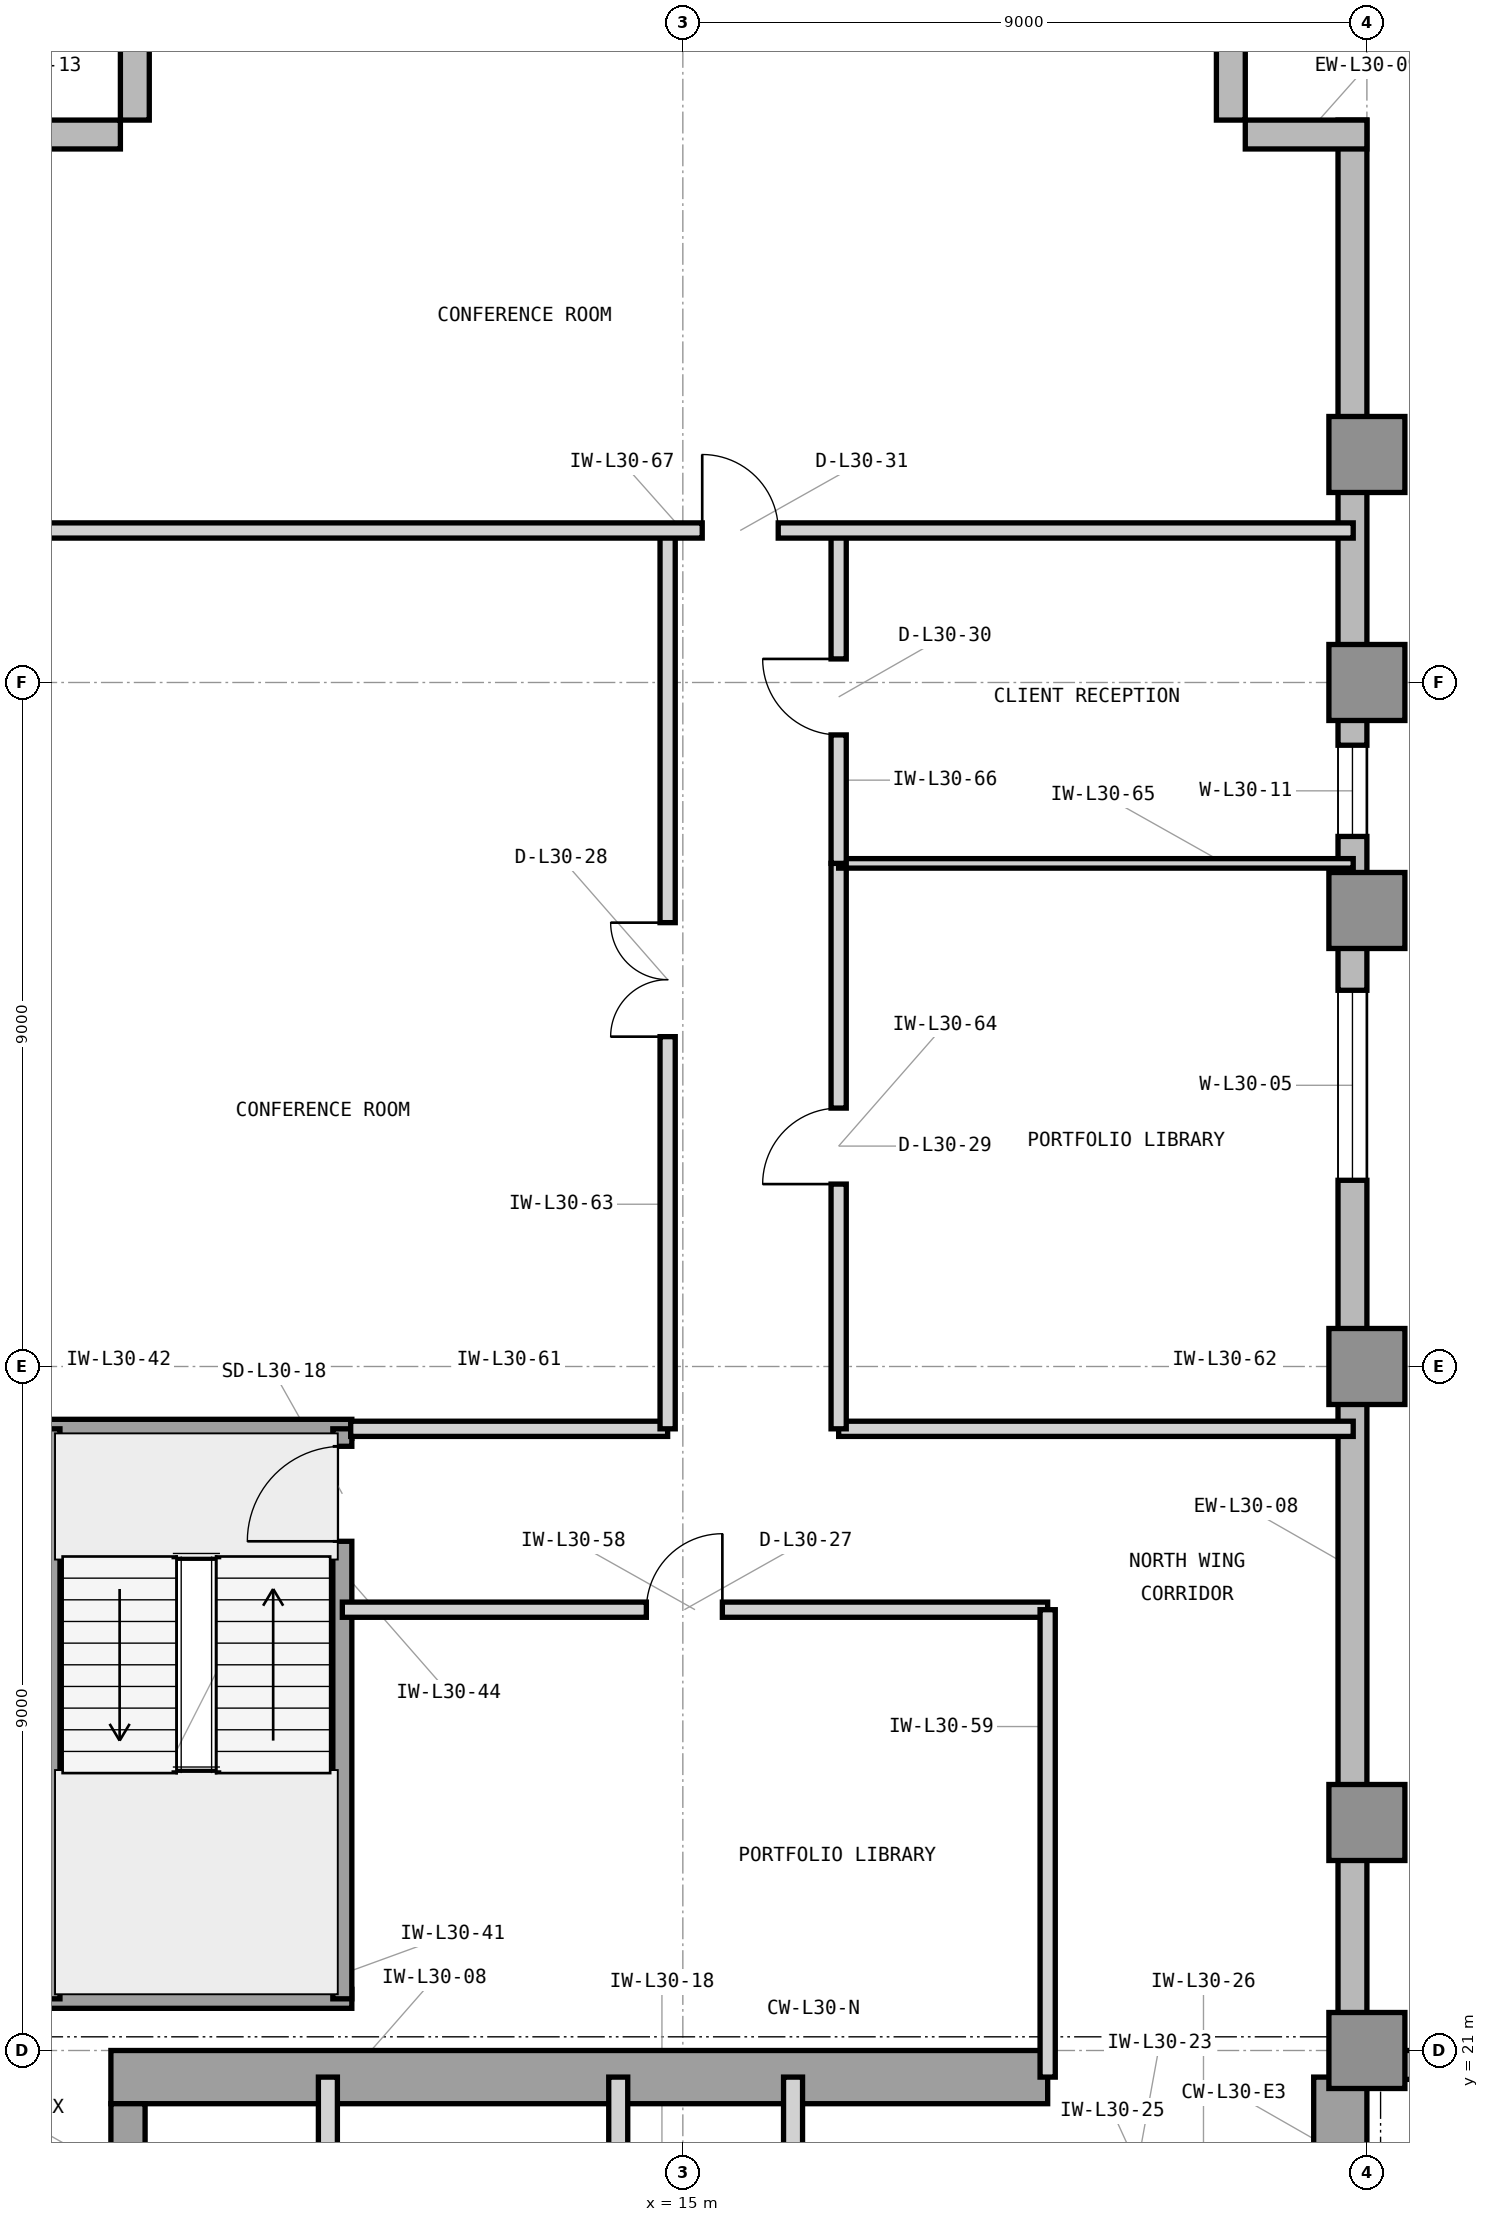
"""IFC4 building model, lengths in metres.
Left out: names, types, materials, properties, quantities, classifications, styles, units other than length and angle.
Written with IfcOpenShell. Run it as: python <this file> out.ifc"""

import sys

from ifc_helpers import new_model, si_unit, direction, frame, frame_2d, origin, origin_2d, place, context, subcontext, project, spatial, rectangle, extrude, element, fill, save


model = new_model("IFC4")
c1 = context("Model", 3, precision=1e-05, world=origin(), true_north=direction((0.0, 1.0)))
c2 = subcontext(c1, "Body", "Model", "MODEL_VIEW")
j1 = project(units=[si_unit("LENGTHUNIT", "METRE"), si_unit("PLANEANGLEUNIT", "RADIAN")], contexts=[c1])
p1 = place(None, origin())
s1 = spatial("IfcSite", under=j1, at=p1, CompositionType="ELEMENT")
p2 = place(p1, origin())
s2 = spatial("IfcBuilding", under=s1, at=p2, CompositionType="ELEMENT")
p3 = place(p2, frame((0.0, 0.0, 128.4)))
s3 = spatial("IfcBuildingStorey", under=s2, at=p3, CompositionType="ELEMENT", Elevation=128.4)
p4 = place(p3, frame((7.475, 20.65, 0.0), z_axis=(0.0, 0.0, 1.0), x_axis=(1.0, 0.0, 0.0)))
e1 = element("IfcWall", 1, at=p4, inside=s3, PredefinedType="SHEAR", context=c2, shape_type="SweptSolid", body=[
    extrude(rectangle(XDim=12.325, YDim=0.7, at=frame_2d((6.163, 0.0))), origin(), (0.0, 0.0, 1.0), 3.9),
])
p5 = place(p3, frame((23.65, 16.6, 0.0), z_axis=(0.0, 0.0, 1.0), x_axis=(0.0, 1.0, 0.0)))
e2 = element("IfcWall", 2, at=p5, inside=s3, PredefinedType="SHEAR", context=c2, shape_type="SweptSolid", body=[
    extrude(rectangle(XDim=4.05, YDim=0.7, at=frame_2d((2.025, 0.0))), origin(), (0.0, 0.0, 1.0), 3.9),
])
p6 = place(p3, frame((7.7, 19.575, 0.0), z_axis=(0.0, 0.0, 1.0), x_axis=(0.0, 1.0, 0.0)))
e3 = element("IfcWall", 3, at=p6, inside=s3, PredefinedType="SHEAR", context=c2, shape_type="SweptSolid", body=[
    extrude(rectangle(XDim=0.725, YDim=0.45, at=frame_2d((0.363, 0.0))), origin(), (0.0, 0.0, 1.0), 3.9),
])
for number, where, z_axis, x_axis in (
    (4, (24.0, 21.0, 0.0), (0.0, 0.0, 1.0), (1.0, 0.0, 0.0)),
    (5, (24.0, 24.0, 0.0), (0.0, 0.0, 1.0), (1.0, 0.0, 0.0)),
    (6, (24.0, 30.0, 0.0), (0.0, 0.0, 1.0), (1.0, 0.0, 0.0)),
    (7, (24.0, 36.0, 0.0), (0.0, 0.0, 1.0), (1.0, 0.0, 0.0)),
    (8, (24.0, 39.0, 0.0), (0.0, 0.0, 1.0), (1.0, 0.0, 0.0)),
    (9, (24.0, 42.0, 0.0), (0.0, 0.0, 1.0), (1.0, 0.0, 0.0)),
):
    element("IfcColumn", number, at=place(p3, frame(where, z_axis=z_axis, x_axis=x_axis)), inside=s3, PredefinedType="COLUMN", context=c2, shape_type="SweptSolid", body=[
        extrude(rectangle(XDim=1.0, YDim=1.0, at=origin_2d()), origin(), (0.0, 0.0, 1.0), 3.9),
    ])
p7 = place(p3, frame((41.55, 20.81, 0.0), z_axis=(0.0, 0.0, 1.0), x_axis=(-1.0, 0.0, 0.0)))
e10 = element("IfcWall", 10, at=p7, inside=s3, PredefinedType="STANDARD", context=c2, shape_type="SweptSolid", body=[
    extrude(rectangle(XDim=17.55, YDim=0.38, at=frame_2d((8.775, 0.0))), origin(), (0.0, 0.0, 1.0), 3.7),
])
p8 = place(p7, frame((2.025, 0.0, 0.85)))
e11 = element("IfcOpeningElement", 11, at=p8, cuts=e10, PredefinedType="OPENING", context=c2, shape_type="SweptSolid", body=[
    extrude(rectangle(XDim=1.8, YDim=2.25, at=frame_2d((0.9, 1.125))), frame((0.0, 0.2, 0.0), z_axis=(0.0, -1.0, 0.0), x_axis=(1.0, 0.0, 0.0)), (0.0, 0.0, 1.0), 0.4),
])
p9 = place(p7, frame((15.384, 0.0, 0.85)))
e12 = element("IfcOpeningElement", 12, at=p9, cuts=e10, PredefinedType="OPENING", context=c2, shape_type="SweptSolid", body=[
    extrude(rectangle(XDim=1.2, YDim=2.25, at=frame_2d((0.6, 1.125))), frame((0.0, 0.2, 0.0), z_axis=(0.0, -1.0, 0.0), x_axis=(1.0, 0.0, 0.0)), (0.0, 0.0, 1.0), 0.4),
])
p10 = place(p7, frame((9.854, 0.0, 0.85)))
e13 = element("IfcOpeningElement", 13, at=p10, cuts=e10, PredefinedType="OPENING", context=c2, shape_type="SweptSolid", body=[
    extrude(rectangle(XDim=2.5, YDim=2.25, at=frame_2d((1.25, 1.125))), frame((0.0, 0.2, 0.0), z_axis=(0.0, -1.0, 0.0), x_axis=(1.0, 0.0, 0.0)), (0.0, 0.0, 1.0), 0.4),
])
p11 = place(p3, frame((23.81, 21.0, 0.0), z_axis=(0.0, 0.0, 1.0), x_axis=(0.0, 1.0, 0.0)))
e14 = element("IfcWall", 14, at=p11, inside=s3, PredefinedType="STANDARD", context=c2, shape_type="SweptSolid", body=[
    extrude(rectangle(XDim=25.4, YDim=0.38, at=frame_2d((12.7, 0.0))), origin(), (0.0, 0.0, 1.0), 3.7),
])
p12 = place(p11, frame((11.45, 0.0, 0.85)))
e15 = element("IfcOpeningElement", 15, at=p12, cuts=e14, PredefinedType="OPENING", context=c2, shape_type="SweptSolid", body=[
    extrude(rectangle(XDim=2.5, YDim=2.25, at=frame_2d((1.25, 1.125))), frame((0.0, 0.2, 0.0), z_axis=(0.0, -1.0, 0.0), x_axis=(1.0, 0.0, 0.0)), (0.0, 0.0, 1.0), 0.4),
])
p13 = place(p11, frame((15.974, 0.0, 0.85)))
e16 = element("IfcOpeningElement", 16, at=p13, cuts=e14, PredefinedType="OPENING", context=c2, shape_type="SweptSolid", body=[
    extrude(rectangle(XDim=1.2, YDim=2.25, at=frame_2d((0.6, 1.125))), frame((0.0, 0.2, 0.0), z_axis=(0.0, -1.0, 0.0), x_axis=(1.0, 0.0, 0.0)), (0.0, 0.0, 1.0), 0.4),
])
for number, where, z_axis, x_axis in (
    (17, (24.0, 46.21, 0.0), (0.0, 0.0, 1.0), (-1.0, 0.0, 0.0)),
    (18, (22.21, 46.4, 0.0), (0.0, 0.0, 1.0), (0.0, 1.0, 0.0)),
    (19, (7.79, 48.0, 0.0), (0.0, 0.0, 1.0), (0.0, -1.0, 0.0)),
    (20, (7.6, 46.21, 0.0), (0.0, 0.0, 1.0), (-1.0, 0.0, 0.0)),
):
    element("IfcWall", number, at=place(p3, frame(where, z_axis=z_axis, x_axis=x_axis)), inside=s3, PredefinedType="STANDARD", context=c2, shape_type="SweptSolid", body=[
        extrude(rectangle(XDim=1.6, YDim=0.38, at=frame_2d((0.8, 0.0))), origin(), (0.0, 0.0, 1.0), 3.7),
    ])
p14 = place(p3, frame((10.33, 19.45, 0.0), z_axis=(0.0, 0.0, 1.0), x_axis=(0.0, 1.0, 0.0)))
e21 = element("IfcWall", 21, at=p14, inside=s3, PredefinedType="PARTITIONING", context=c2, shape_type="SweptSolid", body=[
    extrude(rectangle(XDim=1.2, YDim=0.25, at=frame_2d((0.6, 0.0))), origin(), (0.0, 0.0, 1.0), 2.994),
])
for number, where, z_axis, x_axis in (
    (22, (14.15, 16.7, 0.0), (0.0, 0.0, 1.0), (0.0, 1.0, 0.0)),
    (23, (16.45, 16.7, 0.0), (0.0, 0.0, 1.0), (0.0, 1.0, 0.0)),
):
    element("IfcWall", number, at=place(p3, frame(where, z_axis=z_axis, x_axis=x_axis)), inside=s3, PredefinedType="PARTITIONING", context=c2, shape_type="SweptSolid", body=[
        extrude(rectangle(XDim=3.95, YDim=0.25, at=frame_2d((1.975, 0.0))), origin(), (0.0, 0.0, 1.0), 3.69),
    ])
for number, where, z_axis, x_axis in (
    (24, (6.555, 21.68, 0.0), (0.0, 0.0, 1.0), (1.0, 0.0, 0.0)),
    (25, (6.555, 29.18, 0.0), (0.0, 0.0, 1.0), (1.0, 0.0, 0.0)),
):
    element("IfcWall", number, at=place(p3, frame(where, z_axis=z_axis, x_axis=x_axis)), inside=s3, PredefinedType="SHEAR", context=c2, shape_type="SweptSolid", body=[
        extrude(rectangle(XDim=4.09, YDim=0.25, at=frame_2d((2.045, 0.0))), origin(), (0.0, 0.0, 1.0), 3.9),
    ])
p15 = place(p3, frame((6.68, 21.68, 0.0), z_axis=(0.0, 0.0, 1.0), x_axis=(0.0, 1.0, 0.0)))
e26 = element("IfcWall", 26, at=p15, inside=s3, PredefinedType="SHEAR", context=c2, shape_type="SweptSolid", body=[
    extrude(rectangle(XDim=7.5, YDim=0.25, at=frame_2d((3.75, 0.0))), origin(), (0.0, 0.0, 1.0), 3.9),
])
p16 = place(p3, frame((10.52, 21.68, 0.0), z_axis=(0.0, 0.0, 1.0), x_axis=(0.0, 1.0, 0.0)))
e27 = element("IfcWall", 27, at=p16, inside=s3, PredefinedType="SHEAR", context=c2, shape_type="SweptSolid", body=[
    extrude(rectangle(XDim=7.5, YDim=0.25, at=frame_2d((3.75, 0.0))), origin(), (0.0, 0.0, 1.0), 3.9),
])
p17 = place(p16, frame((6.02, 0.0, 0.0)))
e28 = element("IfcOpeningElement", 28, at=p17, cuts=e27, PredefinedType="OPENING", context=c2, shape_type="SweptSolid", body=[
    extrude(rectangle(XDim=1.25, YDim=2.2, at=frame_2d((0.625, 1.1))), frame((0.0, 0.135, 0.0), z_axis=(0.0, -1.0, 0.0), x_axis=(1.0, 0.0, 0.0)), (0.0, 0.0, 1.0), 0.27),
])
p18 = place(p3, frame((10.52, 26.8, 0.0), z_axis=(0.0, 0.0, 1.0), x_axis=(1.0, 0.0, 0.0)))
e29 = element("IfcWall", 29, at=p18, inside=s3, PredefinedType="PARTITIONING", context=c2, shape_type="SweptSolid", body=[
    extrude(rectangle(XDim=9.28, YDim=0.2, at=frame_2d((4.64, 0.0))), origin(), (0.0, 0.0, 1.0), 3.69),
])
p19 = place(p18, frame((4.0, 0.0, 0.0)))
e30 = element("IfcOpeningElement", 30, at=p19, cuts=e29, PredefinedType="OPENING", context=c2, shape_type="SweptSolid", body=[
    extrude(rectangle(XDim=1.0, YDim=2.15, at=frame_2d((0.5, 1.075))), frame((0.0, 0.11, 0.0), z_axis=(0.0, -1.0, 0.0), x_axis=(1.0, 0.0, 0.0)), (0.0, 0.0, 1.0), 0.22),
])
p20 = place(p3, frame((19.8, 20.65, 0.0), z_axis=(0.0, 0.0, 1.0), x_axis=(0.0, 1.0, 0.0)))
e31 = element("IfcWall", 31, at=p20, inside=s3, PredefinedType="PARTITIONING", context=c2, shape_type="SweptSolid", body=[
    extrude(rectangle(XDim=6.15, YDim=0.2, at=frame_2d((3.075, 0.0))), origin(), (0.0, 0.0, 1.0), 3.69),
])
p21 = place(p3, frame((10.63, 29.18, 0.0), z_axis=(0.0, 0.0, 1.0), x_axis=(1.0, 0.0, 0.0)))
e32 = element("IfcWall", 32, at=p21, inside=s3, PredefinedType="PARTITIONING", context=c2, shape_type="SweptSolid", body=[
    extrude(rectangle(XDim=4.17, YDim=0.2, at=frame_2d((2.085, 0.0))), origin(), (0.0, 0.0, 1.0), 3.69),
])
p22 = place(p3, frame((17.05, 29.18, 0.0), z_axis=(0.0, 0.0, 1.0), x_axis=(1.0, 0.0, 0.0)))
e33 = element("IfcWall", 33, at=p22, inside=s3, PredefinedType="PARTITIONING", context=c2, shape_type="SweptSolid", body=[
    extrude(rectangle(XDim=6.77, YDim=0.2, at=frame_2d((3.385, 0.0))), origin(), (0.0, 0.0, 1.0), 3.69),
])
p23 = place(p3, frame((14.8, 29.18, 0.0), z_axis=(0.0, 0.0, 1.0), x_axis=(0.0, 1.0, 0.0)))
e34 = element("IfcWall", 34, at=p23, inside=s3, PredefinedType="PARTITIONING", context=c2, shape_type="SweptSolid", body=[
    extrude(rectangle(XDim=11.82, YDim=0.2, at=frame_2d((5.91, 0.0))), origin(), (0.0, 0.0, 1.0), 3.69),
])
p24 = place(p23, frame((5.16, 0.0, 0.0)))
e35 = element("IfcOpeningElement", 35, at=p24, cuts=e34, PredefinedType="OPENING", context=c2, shape_type="SweptSolid", body=[
    extrude(rectangle(XDim=1.5, YDim=2.3, at=frame_2d((0.75, 1.15))), frame((0.0, 0.11, 0.0), z_axis=(0.0, -1.0, 0.0), x_axis=(1.0, 0.0, 0.0)), (0.0, 0.0, 1.0), 0.22),
])
p25 = place(p3, frame((17.05, 29.18, 0.0), z_axis=(0.0, 0.0, 1.0), x_axis=(0.0, 1.0, 0.0)))
e36 = element("IfcWall", 36, at=p25, inside=s3, PredefinedType="PARTITIONING", context=c2, shape_type="SweptSolid", body=[
    extrude(rectangle(XDim=7.44, YDim=0.2, at=frame_2d((3.72, 0.0))), origin(), (0.0, 0.0, 1.0), 3.69),
])
p26 = place(p25, frame((3.22, 0.0, 0.0)))
e37 = element("IfcOpeningElement", 37, at=p26, cuts=e36, PredefinedType="OPENING", context=c2, shape_type="SweptSolid", body=[
    extrude(rectangle(XDim=1.0, YDim=2.15, at=frame_2d((0.5, 1.075))), frame((0.0, 0.11, 0.0), z_axis=(0.0, -1.0, 0.0), x_axis=(1.0, 0.0, 0.0)), (0.0, 0.0, 1.0), 0.22),
])
p27 = place(p3, frame((17.05, 36.62, 0.0), z_axis=(0.0, 0.0, 1.0), x_axis=(1.0, 0.0, 0.0)))
e38 = element("IfcWall", 38, at=p27, inside=s3, PredefinedType="PARTITIONING", context=c2, shape_type="SweptSolid", body=[
    extrude(rectangle(XDim=6.77, YDim=0.125, at=frame_2d((3.385, 0.0))), origin(), (0.0, 0.0, 1.0), 3.69),
])
p28 = place(p3, frame((17.05, 36.62, 0.0), z_axis=(0.0, 0.0, 1.0), x_axis=(0.0, 1.0, 0.0)))
e39 = element("IfcWall", 39, at=p28, inside=s3, PredefinedType="PARTITIONING", context=c2, shape_type="SweptSolid", body=[
    extrude(rectangle(XDim=4.38, YDim=0.2, at=frame_2d((2.19, 0.0))), origin(), (0.0, 0.0, 1.0), 3.69),
])
p29 = place(p28, frame((1.69, 0.0, 0.0)))
e40 = element("IfcOpeningElement", 40, at=p29, cuts=e39, PredefinedType="OPENING", context=c2, shape_type="SweptSolid", body=[
    extrude(rectangle(XDim=1.0, YDim=2.15, at=frame_2d((0.5, 1.075))), frame((0.0, 0.11, 0.0), z_axis=(0.0, -1.0, 0.0), x_axis=(1.0, 0.0, 0.0)), (0.0, 0.0, 1.0), 0.22),
])
p30 = place(p3, frame((6.18, 41.0, 0.0), z_axis=(0.0, 0.0, 1.0), x_axis=(1.0, 0.0, 0.0)))
e41 = element("IfcWall", 41, at=p30, inside=s3, PredefinedType="PARTITIONING", context=c2, shape_type="SweptSolid", body=[
    extrude(rectangle(XDim=17.64, YDim=0.2, at=frame_2d((8.82, 0.0))), origin(), (0.0, 0.0, 1.0), 3.69),
])
p31 = place(p30, frame((9.075, 0.0, 0.0)))
e42 = element("IfcOpeningElement", 42, at=p31, cuts=e41, PredefinedType="OPENING", context=c2, shape_type="SweptSolid", body=[
    extrude(rectangle(XDim=1.0, YDim=2.15, at=frame_2d((0.5, 1.075))), frame((0.0, 0.11, 0.0), z_axis=(0.0, -1.0, 0.0), x_axis=(1.0, 0.0, 0.0)), (0.0, 0.0, 1.0), 0.22),
])
p32 = place(p12, origin())
e43 = element("IfcWindow", 43, at=p32, inside=s3, PartitioningType="SINGLE_PANEL", PredefinedType="WINDOW", context=c2, shape_type="SweptSolid", body=[
    extrude(rectangle(XDim=2.5, YDim=2.25, at=frame_2d((1.25, 1.125))), frame((0.0, 0.11, 0.0), z_axis=(0.0, -1.0, 0.0), x_axis=(1.0, 0.0, 0.0)), (0.0, 0.0, 1.0), 0.06),
])
fill(e15, e43)
p33 = place(p17, origin())
e44 = element("IfcDoor", 44, at=p33, inside=s3, OperationType="SINGLE_SWING_LEFT", PredefinedType="DOOR", context=c2, shape_type="SweptSolid", body=[
    extrude(rectangle(XDim=1.25, YDim=2.2, at=frame_2d((0.625, 1.1))), frame((0.0, 0.025, 0.0), z_axis=(0.0, -1.0, 0.0), x_axis=(1.0, 0.0, 0.0)), (0.0, 0.0, 1.0), 0.05),
])
fill(e28, e44)
p34 = place(p19, origin())
e45 = element("IfcDoor", 45, at=p34, inside=s3, OperationType="SINGLE_SWING_RIGHT", PredefinedType="DOOR", context=c2, shape_type="SweptSolid", body=[
    extrude(rectangle(XDim=1.0, YDim=2.15, at=frame_2d((0.5, 1.075))), frame((0.0, 0.025, 0.0), z_axis=(0.0, -1.0, 0.0), x_axis=(1.0, 0.0, 0.0)), (0.0, 0.0, 1.0), 0.05),
])
fill(e30, e45)
p35 = place(p24, origin())
e46 = element("IfcDoor", 46, at=p35, inside=s3, OperationType="DOUBLE_DOOR_SINGLE_SWING", PredefinedType="DOOR", context=c2, shape_type="SweptSolid", body=[
    extrude(rectangle(XDim=1.5, YDim=2.3, at=frame_2d((0.75, 1.15))), frame((0.0, 0.025, 0.0), z_axis=(0.0, -1.0, 0.0), x_axis=(1.0, 0.0, 0.0)), (0.0, 0.0, 1.0), 0.05),
])
fill(e35, e46)
p36 = place(p26, origin())
e47 = element("IfcDoor", 47, at=p36, inside=s3, OperationType="SINGLE_SWING_LEFT", PredefinedType="DOOR", context=c2, shape_type="SweptSolid", body=[
    extrude(rectangle(XDim=1.0, YDim=2.15, at=frame_2d((0.5, 1.075))), frame((0.0, 0.025, 0.0), z_axis=(0.0, -1.0, 0.0), x_axis=(1.0, 0.0, 0.0)), (0.0, 0.0, 1.0), 0.05),
])
fill(e37, e47)
p37 = place(p29, origin())
e48 = element("IfcDoor", 48, at=p37, inside=s3, OperationType="SINGLE_SWING_RIGHT", PredefinedType="DOOR", context=c2, shape_type="SweptSolid", body=[
    extrude(rectangle(XDim=1.0, YDim=2.15, at=frame_2d((0.5, 1.075))), frame((0.0, 0.025, 0.0), z_axis=(0.0, -1.0, 0.0), x_axis=(1.0, 0.0, 0.0)), (0.0, 0.0, 1.0), 0.05),
])
fill(e40, e48)
p38 = place(p31, origin())
e49 = element("IfcDoor", 49, at=p38, inside=s3, OperationType="SINGLE_SWING_LEFT", PredefinedType="DOOR", context=c2, shape_type="SweptSolid", body=[
    extrude(rectangle(XDim=1.0, YDim=2.15, at=frame_2d((0.5, 1.075))), frame((0.0, 0.025, 0.0), z_axis=(0.0, -1.0, 0.0), x_axis=(1.0, 0.0, 0.0)), (0.0, 0.0, 1.0), 0.05),
])
fill(e42, e49)
p39 = place(p13, origin())
e50 = element("IfcWindow", 50, at=p39, inside=s3, PartitioningType="SINGLE_PANEL", PredefinedType="WINDOW", context=c2, shape_type="SweptSolid", body=[
    extrude(rectangle(XDim=1.2, YDim=2.25, at=frame_2d((0.6, 1.125))), frame((0.0, 0.11, 0.0), z_axis=(0.0, -1.0, 0.0), x_axis=(1.0, 0.0, 0.0)), (0.0, 0.0, 1.0), 0.06),
])
fill(e16, e50)
save(model, sys.argv[1])
